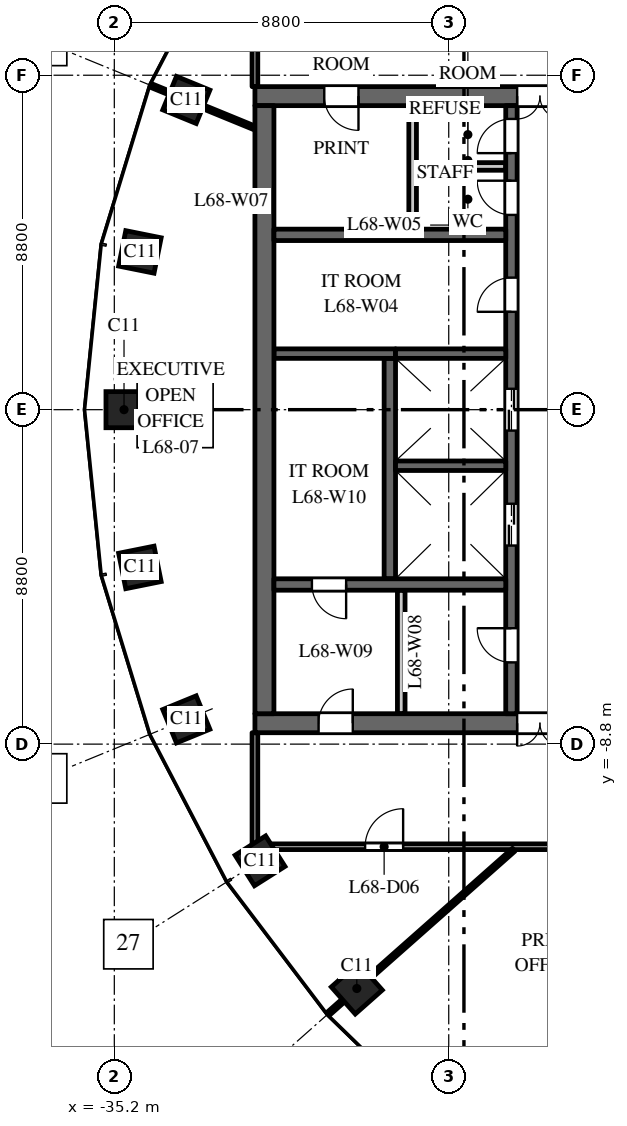
"""IFC4 building model, lengths in metres.
Left out: names, types, materials, properties, quantities, classifications, styles, units other than length and angle.
Written with IfcOpenShell. Run it as: python <this file> out.ifc"""

import sys

from ifc_helpers import new_model, si_unit, direction, frame, frame_2d, origin, origin_2d, place, context, subcontext, project, spatial, rectangle, extrude, element, fill, save


model = new_model("IFC4")
c1 = context("Model", 3, precision=1e-05, world=origin(), true_north=direction((0.0, 1.0)))
c2 = subcontext(c1, "Body", "Model", "MODEL_VIEW")
j1 = project(units=[si_unit("LENGTHUNIT", "METRE"), si_unit("PLANEANGLEUNIT", "RADIAN")], contexts=[c1])
p1 = place(None, origin())
s1 = spatial("IfcSite", under=j1, at=p1, CompositionType="ELEMENT")
p2 = place(p1, origin())
s2 = spatial("IfcBuilding", under=s1, at=p2, CompositionType="ELEMENT")
p3 = place(p2, frame((0.0, 0.0, 315.0)))
s3 = spatial("IfcBuildingStorey", under=s2, at=p3, CompositionType="ELEMENT", Elevation=315.0)
for number, where, z_axis, x_axis in (
    (1, (-33.305, 8.149, 0.0), (0.0, 0.0, 1.0), (-0.379, -0.925, 0.0)),
    (2, (-34.527, 4.151, 0.0), (0.0, 0.0, 1.0), (-0.197, -0.98, 0.0)),
    (3, (-34.945, 0.0, 0.0), (0.0, 0.0, 1.0), (0.0, -1.0, 0.0)),
    (4, (-34.527, -4.151, 0.0), (0.0, 0.0, 1.0), (0.197, -0.98, 0.0)),
    (5, (-33.305, -8.149, 0.0), (0.0, 0.0, 1.0), (0.379, -0.925, 0.0)),
    (6, (-31.365, -11.871, 0.0), (0.0, 0.0, 1.0), (0.535, -0.845, 0.0)),
    (7, (-28.819, -15.23, 0.0), (0.0, 0.0, 1.0), (0.663, -0.749, 0.0)),
):
    element("IfcColumn", number, at=place(p3, frame(where, z_axis=z_axis, x_axis=x_axis)), inside=s3, PredefinedType="COLUMN", context=c2, shape_type="SweptSolid", body=[
        extrude(rectangle(XDim=0.95, YDim=0.95, at=origin_2d()), origin(), (0.0, 0.0, 1.0), 4.0),
    ])
p4 = place(p3, frame((-16.5, 8.25, 0.0), z_axis=(0.0, 0.0, 1.0), x_axis=(-1.0, 0.0, 0.0)))
e8 = element("IfcWall", 8, at=p4, inside=s3, PredefinedType="SHEAR", context=c2, shape_type="SweptSolid", body=[
    extrude(rectangle(XDim=15.0, YDim=0.5, at=frame_2d((7.5, 0.0))), origin(), (0.0, 0.0, 1.0), 3.7),
])
p5 = place(p4, frame((6.9, 0.0, 0.0)))
e9 = element("IfcOpeningElement", 9, at=p5, cuts=e8, PredefinedType="OPENING", context=c2, shape_type="SweptSolid", body=[
    extrude(rectangle(XDim=1.2, YDim=2.1, at=frame_2d((0.6, 1.05))), frame((0.0, 0.26, 0.0), z_axis=(0.0, -1.0, 0.0), x_axis=(1.0, 0.0, 0.0)), (0.0, 0.0, 1.0), 0.52),
])
p6 = place(p4, frame((12.275, 0.0, 0.0)))
e10 = element("IfcOpeningElement", 10, at=p6, cuts=e8, PredefinedType="OPENING", context=c2, shape_type="SweptSolid", body=[
    extrude(rectangle(XDim=0.9, YDim=2.1, at=frame_2d((0.45, 1.05))), frame((0.0, 0.26, 0.0), z_axis=(0.0, -1.0, 0.0), x_axis=(1.0, 0.0, 0.0)), (0.0, 0.0, 1.0), 0.52),
])
p7 = place(p3, frame((-16.5, -8.25, 0.0), z_axis=(0.0, 0.0, 1.0), x_axis=(-1.0, 0.0, 0.0)))
e11 = element("IfcWall", 11, at=p7, inside=s3, PredefinedType="SHEAR", context=c2, shape_type="SweptSolid", body=[
    extrude(rectangle(XDim=15.0, YDim=0.5, at=frame_2d((7.5, 0.0))), origin(), (0.0, 0.0, 1.0), 3.7),
])
p8 = place(p7, frame((6.9, 0.0, 0.0)))
e12 = element("IfcOpeningElement", 12, at=p8, cuts=e11, PredefinedType="OPENING", context=c2, shape_type="SweptSolid", body=[
    extrude(rectangle(XDim=1.2, YDim=2.1, at=frame_2d((0.6, 1.05))), frame((0.0, 0.26, 0.0), z_axis=(0.0, -1.0, 0.0), x_axis=(1.0, 0.0, 0.0)), (0.0, 0.0, 1.0), 0.52),
])
p9 = place(p7, frame((12.425, 0.0, 0.0)))
e13 = element("IfcOpeningElement", 13, at=p9, cuts=e11, PredefinedType="OPENING", context=c2, shape_type="SweptSolid", body=[
    extrude(rectangle(XDim=0.9, YDim=2.1, at=frame_2d((0.45, 1.05))), frame((0.0, 0.26, 0.0), z_axis=(0.0, -1.0, 0.0), x_axis=(1.0, 0.0, 0.0)), (0.0, 0.0, 1.0), 0.52),
])
p10 = place(p3, frame((-27.95, -4.45, 0.0), z_axis=(0.0, 0.0, 1.0), x_axis=(0.0, 1.0, 0.0)))
e14 = element("IfcWall", 14, at=p10, inside=s3, PredefinedType="SHEAR", context=c2, shape_type="SweptSolid", body=[
    extrude(rectangle(XDim=5.8, YDim=0.3, at=frame_2d((2.9, 0.0))), origin(), (0.0, 0.0, 1.0), 3.7),
])
p11 = place(p3, frame((-27.8, 1.475, 0.0), z_axis=(0.0, 0.0, 1.0), x_axis=(-1.0, 0.0, 0.0)))
e15 = element("IfcWall", 15, at=p11, inside=s3, PredefinedType="SHEAR", context=c2, shape_type="SweptSolid", body=[
    extrude(rectangle(XDim=3.2, YDim=0.25, at=frame_2d((1.6, 0.0))), origin(), (0.0, 0.0, 1.0), 3.7),
])
p12 = place(p3, frame((-24.75, -8.0, 0.0), z_axis=(0.0, 0.0, 1.0), x_axis=(0.0, 1.0, 0.0)))
e16 = element("IfcWall", 16, at=p12, inside=s3, PredefinedType="SHEAR", context=c2, shape_type="SweptSolid", body=[
    extrude(rectangle(XDim=16.0, YDim=0.3, at=frame_2d((8.0, 0.0))), origin(), (0.0, 0.0, 1.0), 3.7),
])
p13 = place(p12, frame((4.425, 0.0, 0.0)))
e17 = element("IfcOpeningElement", 17, at=p13, cuts=e16, PredefinedType="OPENING", context=c2, shape_type="SweptSolid", body=[
    extrude(rectangle(XDim=1.1, YDim=2.1, at=frame_2d((0.55, 1.05))), frame((0.0, 0.16, 0.0), z_axis=(0.0, -1.0, 0.0), x_axis=(1.0, 0.0, 0.0)), (0.0, 0.0, 1.0), 0.32),
])
p14 = place(p12, frame((7.45, 0.0, 0.0)))
e18 = element("IfcOpeningElement", 18, at=p14, cuts=e16, PredefinedType="OPENING", context=c2, shape_type="SweptSolid", body=[
    extrude(rectangle(XDim=1.1, YDim=2.1, at=frame_2d((0.55, 1.05))), frame((0.0, 0.16, 0.0), z_axis=(0.0, -1.0, 0.0), x_axis=(1.0, 0.0, 0.0)), (0.0, 0.0, 1.0), 0.32),
])
p15 = place(p12, frame((10.575, 0.0, 0.0)))
e19 = element("IfcOpeningElement", 19, at=p15, cuts=e16, PredefinedType="OPENING", context=c2, shape_type="SweptSolid", body=[
    extrude(rectangle(XDim=0.9, YDim=2.1, at=frame_2d((0.45, 1.05))), frame((0.0, 0.16, 0.0), z_axis=(0.0, -1.0, 0.0), x_axis=(1.0, 0.0, 0.0)), (0.0, 0.0, 1.0), 0.32),
])
p16 = place(p12, frame((13.125, 0.0, 0.0)))
e20 = element("IfcOpeningElement", 20, at=p16, cuts=e16, PredefinedType="OPENING", context=c2, shape_type="SweptSolid", body=[
    extrude(rectangle(XDim=0.9, YDim=2.1, at=frame_2d((0.45, 1.05))), frame((0.0, 0.16, 0.0), z_axis=(0.0, -1.0, 0.0), x_axis=(1.0, 0.0, 0.0)), (0.0, 0.0, 1.0), 0.32),
])
p17 = place(p12, frame((14.75, 0.0, 0.0)))
e21 = element("IfcOpeningElement", 21, at=p17, cuts=e16, PredefinedType="OPENING", context=c2, shape_type="SweptSolid", body=[
    extrude(rectangle(XDim=0.9, YDim=2.1, at=frame_2d((0.45, 1.05))), frame((0.0, 0.16, 0.0), z_axis=(0.0, -1.0, 0.0), x_axis=(1.0, 0.0, 0.0)), (0.0, 0.0, 1.0), 0.32),
])
p18 = place(p12, frame((1.35, 0.0, 0.0)))
e22 = element("IfcOpeningElement", 22, at=p18, cuts=e16, PredefinedType="OPENING", context=c2, shape_type="SweptSolid", body=[
    extrude(rectangle(XDim=0.9, YDim=2.1, at=frame_2d((0.45, 1.05))), frame((0.0, 0.16, 0.0), z_axis=(0.0, -1.0, 0.0), x_axis=(1.0, 0.0, 0.0)), (0.0, 0.0, 1.0), 0.32),
])
p19 = place(p3, frame((-31.25, -8.0, 0.0), z_axis=(0.0, 0.0, 1.0), x_axis=(0.0, 1.0, 0.0)))
e23 = element("IfcWall", 23, at=p19, inside=s3, PredefinedType="SHEAR", context=c2, shape_type="SweptSolid", body=[
    extrude(rectangle(XDim=16.0, YDim=0.5, at=frame_2d((8.0, 0.0))), origin(), (0.0, 0.0, 1.0), 3.7),
])
p20 = place(p3, frame((-24.9, 4.6, 0.0), z_axis=(0.0, 0.0, 1.0), x_axis=(-1.0, 0.0, 0.0)))
e24 = element("IfcWall", 24, at=p20, inside=s3, PredefinedType="SHEAR", context=c2, shape_type="SweptSolid", body=[
    extrude(rectangle(XDim=6.1, YDim=0.3, at=frame_2d((3.05, 0.0))), origin(), (0.0, 0.0, 1.0), 3.7),
])
for number, where, z_axis, x_axis in (
    (25, (-27.35, 4.75, 0.0), (0.0, 0.0, 1.0), (0.0, 1.0, 0.0)),
    (26, (-27.65, -8.0, 0.0), (0.0, 0.0, 1.0), (0.0, 1.0, 0.0)),
):
    element("IfcWall", number, at=place(p3, frame(where, z_axis=z_axis, x_axis=x_axis)), inside=s3, PredefinedType="PARTITIONING", context=c2, shape_type="SweptSolid", body=[
        extrude(rectangle(XDim=3.25, YDim=0.2, at=frame_2d((1.625, 0.0))), origin(), (0.0, 0.0, 1.0), 3.7),
    ])
p21 = place(p3, frame((-24.9, 6.4, 0.0), z_axis=(0.0, 0.0, 1.0), x_axis=(-1.0, 0.0, 0.0)))
e27 = element("IfcWall", 27, at=p21, inside=s3, PredefinedType="PARTITIONING", context=c2, shape_type="SweptSolid", body=[
    extrude(rectangle(XDim=2.35, YDim=0.2, at=frame_2d((1.175, 0.0))), origin(), (0.0, 0.0, 1.0), 3.7),
])
p22 = place(p3, frame((-24.9, -4.6, 0.0), z_axis=(0.0, 0.0, 1.0), x_axis=(-1.0, 0.0, 0.0)))
e28 = element("IfcWall", 28, at=p22, inside=s3, PredefinedType="SHEAR", context=c2, shape_type="SweptSolid", body=[
    extrude(rectangle(XDim=6.1, YDim=0.3, at=frame_2d((3.05, 0.0))), origin(), (0.0, 0.0, 1.0), 3.7),
])
p23 = place(p22, frame((4.2, 0.0, 0.0)))
e29 = element("IfcOpeningElement", 29, at=p23, cuts=e28, PredefinedType="OPENING", context=c2, shape_type="SweptSolid", body=[
    extrude(rectangle(XDim=0.9, YDim=2.1, at=frame_2d((0.45, 1.05))), frame((0.0, 0.16, 0.0), z_axis=(0.0, -1.0, 0.0), x_axis=(1.0, 0.0, 0.0)), (0.0, 0.0, 1.0), 0.32),
])
for number, where, z_axis, x_axis in (
    (30, (-24.9, -1.475, 0.0), (0.0, 0.0, 1.0), (-1.0, 0.0, 0.0)),
    (31, (-24.9, 1.475, 0.0), (0.0, 0.0, 1.0), (-1.0, 0.0, 0.0)),
):
    element("IfcWall", number, at=place(p3, frame(where, z_axis=z_axis, x_axis=x_axis)), inside=s3, PredefinedType="SHEAR", context=c2, shape_type="SweptSolid", body=[
        extrude(rectangle(XDim=2.9, YDim=0.25, at=frame_2d((1.45, 0.0))), origin(), (0.0, 0.0, 1.0), 3.7),
    ])
p24 = place(p3, frame((-34.234, 8.53, 0.0), z_axis=(0.0, 0.0, 1.0), x_axis=(0.925344112436, -0.379128307542, 0.0)))
e32 = element("IfcWall", 32, at=p24, inside=s3, PredefinedType="PARTITIONING", context=c2, shape_type="SweptSolid", body=[
    extrude(rectangle(XDim=2.954, YDim=0.1, at=frame_2d((1.477, 0.0))), origin(), (0.0, 0.0, 1.0), 3.0),
])
p25 = place(p3, frame((-31.5, -11.5, 0.0), z_axis=(0.0, 0.0, 1.0), x_axis=(0.0, 1.0, 0.0)))
e33 = element("IfcWall", 33, at=p25, inside=s3, PredefinedType="PARTITIONING", context=c2, shape_type="SweptSolid", body=[
    extrude(rectangle(XDim=3.0, YDim=0.15, at=frame_2d((1.5, 0.0))), origin(), (0.0, 0.0, 1.0), 3.0),
])
p26 = place(p3, frame((-31.5, -11.5, 0.0), z_axis=(0.0, 0.0, 1.0), x_axis=(1.0, 0.0, 0.0)))
e34 = element("IfcWall", 34, at=p26, inside=s3, PredefinedType="PARTITIONING", context=c2, shape_type="SweptSolid", body=[
    extrude(rectangle(XDim=21.432, YDim=0.15, at=frame_2d((10.716, 0.0))), origin(), (0.0, 0.0, 1.0), 2.75),
])
p27 = place(p26, frame((2.9, 0.0, 0.0)))
e35 = element("IfcOpeningElement", 35, at=p27, cuts=e34, PredefinedType="OPENING", context=c2, shape_type="SweptSolid", body=[
    extrude(rectangle(XDim=1.0, YDim=2.1, at=frame_2d((0.5, 1.05))), frame((0.0, 0.085, 0.0), z_axis=(0.0, -1.0, 0.0), x_axis=(1.0, 0.0, 0.0)), (0.0, 0.0, 1.0), 0.17),
])
p28 = place(p26, frame((10.544, 0.0, 0.0)))
e36 = element("IfcOpeningElement", 36, at=p28, cuts=e34, PredefinedType="OPENING", context=c2, shape_type="SweptSolid", body=[
    extrude(rectangle(XDim=1.0, YDim=2.1, at=frame_2d((0.5, 1.05))), frame((0.0, 0.085, 0.0), z_axis=(0.0, -1.0, 0.0), x_axis=(1.0, 0.0, 0.0)), (0.0, 0.0, 1.0), 0.17),
])
p29 = place(p26, frame((17.718, 0.0, 0.0)))
e37 = element("IfcOpeningElement", 37, at=p29, cuts=e34, PredefinedType="OPENING", context=c2, shape_type="SweptSolid", body=[
    extrude(rectangle(XDim=1.0, YDim=2.1, at=frame_2d((0.5, 1.05))), frame((0.0, 0.085, 0.0), z_axis=(0.0, -1.0, 0.0), x_axis=(1.0, 0.0, 0.0)), (0.0, 0.0, 1.0), 0.17),
])
p30 = place(p3, frame((-31.5, 8.5, 0.0), z_axis=(0.0, 0.0, 1.0), x_axis=(0.0, 1.0, 0.0)))
e38 = element("IfcWall", 38, at=p30, inside=s3, PredefinedType="PARTITIONING", context=c2, shape_type="SweptSolid", body=[
    extrude(rectangle(XDim=3.0, YDim=0.15, at=frame_2d((1.5, 0.0))), origin(), (0.0, 0.0, 1.0), 3.0),
])
p31 = place(p3, frame((-29.569, -15.895, 0.0), z_axis=(0.0, 0.0, 1.0), x_axis=(0.748988695283, 0.662582775461, 0.0)))
e39 = element("IfcWall", 39, at=p31, inside=s3, PredefinedType="PARTITIONING", context=c2, shape_type="SweptSolid", body=[
    extrude(rectangle(XDim=6.516, YDim=0.1, at=frame_2d((3.258, 0.0))), origin(), (0.0, 0.0, 1.0), 3.0),
])
p32 = place(p13, origin())
e40 = element("IfcDoor", 40, at=p32, inside=s3, OperationType="DOUBLE_DOOR_SLIDING", PredefinedType="DOOR", context=c2, shape_type="SweptSolid", body=[
    extrude(rectangle(XDim=1.1, YDim=2.1, at=frame_2d((0.55, 1.05))), frame((0.0, 0.025, 0.0), z_axis=(0.0, -1.0, 0.0), x_axis=(1.0, 0.0, 0.0)), (0.0, 0.0, 1.0), 0.05),
])
fill(e17, e40)
p33 = place(p14, origin())
e41 = element("IfcDoor", 41, at=p33, inside=s3, OperationType="DOUBLE_DOOR_SLIDING", PredefinedType="DOOR", context=c2, shape_type="SweptSolid", body=[
    extrude(rectangle(XDim=1.1, YDim=2.1, at=frame_2d((0.55, 1.05))), frame((0.0, 0.025, 0.0), z_axis=(0.0, -1.0, 0.0), x_axis=(1.0, 0.0, 0.0)), (0.0, 0.0, 1.0), 0.05),
])
fill(e18, e41)
p34 = place(p5, origin())
e42 = element("IfcDoor", 42, at=p34, inside=s3, OperationType="DOUBLE_DOOR_DOUBLE_SWING", PredefinedType="DOOR", context=c2, shape_type="SweptSolid", body=[
    extrude(rectangle(XDim=1.2, YDim=2.1, at=frame_2d((0.6, 1.05))), frame((0.0, 0.025, 0.0), z_axis=(0.0, -1.0, 0.0), x_axis=(1.0, 0.0, 0.0)), (0.0, 0.0, 1.0), 0.05),
])
fill(e9, e42)
p35 = place(p8, origin())
e43 = element("IfcDoor", 43, at=p35, inside=s3, OperationType="DOUBLE_DOOR_DOUBLE_SWING", PredefinedType="DOOR", context=c2, shape_type="SweptSolid", body=[
    extrude(rectangle(XDim=1.2, YDim=2.1, at=frame_2d((0.6, 1.05))), frame((0.0, 0.025, 0.0), z_axis=(0.0, -1.0, 0.0), x_axis=(1.0, 0.0, 0.0)), (0.0, 0.0, 1.0), 0.05),
])
fill(e12, e43)
p36 = place(p15, origin())
e44 = element("IfcDoor", 44, at=p36, inside=s3, OperationType="SINGLE_SWING_RIGHT", PredefinedType="DOOR", context=c2, shape_type="SweptSolid", body=[
    extrude(rectangle(XDim=0.9, YDim=2.1, at=frame_2d((0.45, 1.05))), frame((0.0, 0.025, 0.0), z_axis=(0.0, -1.0, 0.0), x_axis=(1.0, 0.0, 0.0)), (0.0, 0.0, 1.0), 0.05),
])
fill(e19, e44)
p37 = place(p16, origin())
e45 = element("IfcDoor", 45, at=p37, inside=s3, OperationType="SINGLE_SWING_LEFT", PredefinedType="DOOR", context=c2, shape_type="SweptSolid", body=[
    extrude(rectangle(XDim=0.9, YDim=2.1, at=frame_2d((0.45, 1.05))), frame((0.0, 0.025, 0.0), z_axis=(0.0, -1.0, 0.0), x_axis=(1.0, 0.0, 0.0)), (0.0, 0.0, 1.0), 0.05),
])
fill(e20, e45)
p38 = place(p17, origin())
e46 = element("IfcDoor", 46, at=p38, inside=s3, OperationType="SINGLE_SWING_RIGHT", PredefinedType="DOOR", context=c2, shape_type="SweptSolid", body=[
    extrude(rectangle(XDim=0.9, YDim=2.1, at=frame_2d((0.45, 1.05))), frame((0.0, 0.025, 0.0), z_axis=(0.0, -1.0, 0.0), x_axis=(1.0, 0.0, 0.0)), (0.0, 0.0, 1.0), 0.05),
])
fill(e21, e46)
p39 = place(p6, origin())
e47 = element("IfcDoor", 47, at=p39, inside=s3, OperationType="SINGLE_SWING_RIGHT", PredefinedType="DOOR", context=c2, shape_type="SweptSolid", body=[
    extrude(rectangle(XDim=0.9, YDim=2.1, at=frame_2d((0.45, 1.05))), frame((0.0, 0.025, 0.0), z_axis=(0.0, -1.0, 0.0), x_axis=(1.0, 0.0, 0.0)), (0.0, 0.0, 1.0), 0.05),
])
fill(e10, e47)
p40 = place(p18, origin())
e48 = element("IfcDoor", 48, at=p40, inside=s3, OperationType="SINGLE_SWING_LEFT", PredefinedType="DOOR", context=c2, shape_type="SweptSolid", body=[
    extrude(rectangle(XDim=0.9, YDim=2.1, at=frame_2d((0.45, 1.05))), frame((0.0, 0.025, 0.0), z_axis=(0.0, -1.0, 0.0), x_axis=(1.0, 0.0, 0.0)), (0.0, 0.0, 1.0), 0.05),
])
fill(e22, e48)
p41 = place(p9, origin())
e49 = element("IfcDoor", 49, at=p41, inside=s3, OperationType="SINGLE_SWING_LEFT", PredefinedType="DOOR", context=c2, shape_type="SweptSolid", body=[
    extrude(rectangle(XDim=0.9, YDim=2.1, at=frame_2d((0.45, 1.05))), frame((0.0, 0.025, 0.0), z_axis=(0.0, -1.0, 0.0), x_axis=(1.0, 0.0, 0.0)), (0.0, 0.0, 1.0), 0.05),
])
fill(e13, e49)
p42 = place(p23, origin())
e50 = element("IfcDoor", 50, at=p42, inside=s3, OperationType="SINGLE_SWING_RIGHT", PredefinedType="DOOR", context=c2, shape_type="SweptSolid", body=[
    extrude(rectangle(XDim=0.9, YDim=2.1, at=frame_2d((0.45, 1.05))), frame((0.0, 0.025, 0.0), z_axis=(0.0, -1.0, 0.0), x_axis=(1.0, 0.0, 0.0)), (0.0, 0.0, 1.0), 0.05),
])
fill(e29, e50)
p43 = place(p27, origin())
e51 = element("IfcDoor", 51, at=p43, inside=s3, OperationType="SINGLE_SWING_RIGHT", PredefinedType="DOOR", context=c2, shape_type="SweptSolid", body=[
    extrude(rectangle(XDim=1.0, YDim=2.1, at=frame_2d((0.5, 1.05))), frame((0.0, 0.025, 0.0), z_axis=(0.0, -1.0, 0.0), x_axis=(1.0, 0.0, 0.0)), (0.0, 0.0, 1.0), 0.05),
])
fill(e35, e51)
save(model, sys.argv[1])
